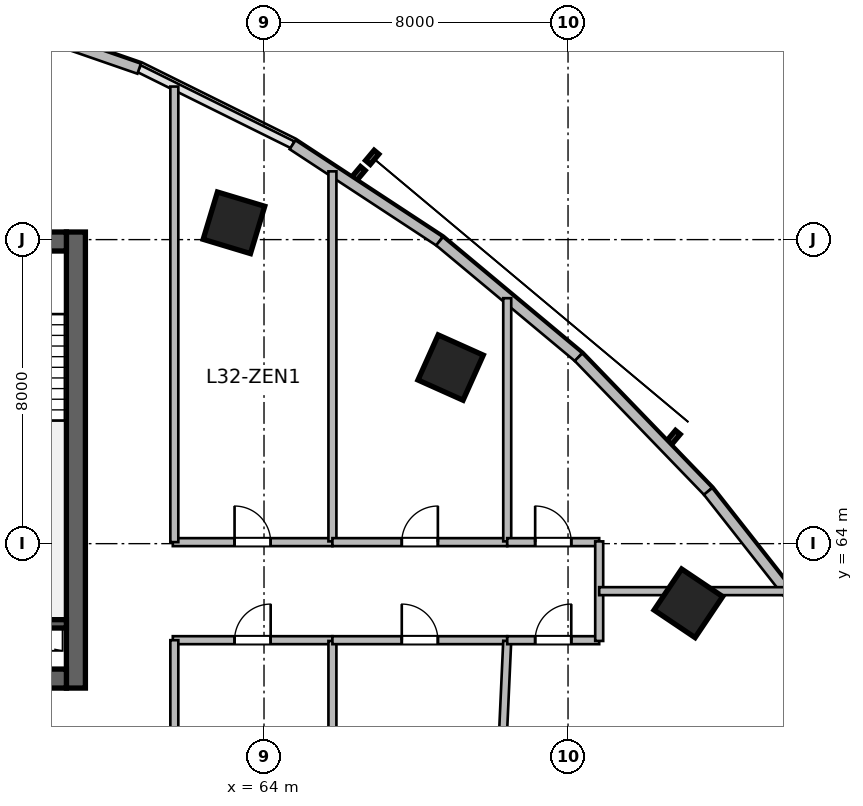
"""IFC4 building model, lengths in metres.
Left out: names, types, materials, properties, quantities, classifications, styles, units other than length and angle.
Written with IfcOpenShell. Run it as: python <this file> out.ifc"""

import sys

from ifc_helpers import new_model, si_unit, direction, frame, frame_2d, origin, origin_2d, place, context, subcontext, project, spatial, rectangle, extrude, source, transform, mapped, element, fill, save


model = new_model("IFC4")
c1 = context("Model", 3, precision=1e-05, world=origin(), true_north=direction((0.0, 1.0)))
c2 = subcontext(c1, "Body", "Model", "MODEL_VIEW")
j1 = project(units=[si_unit("LENGTHUNIT", "METRE"), si_unit("PLANEANGLEUNIT", "RADIAN")], contexts=[c1])
p1 = place(None, origin())
s1 = spatial("IfcSite", under=j1, at=p1, CompositionType="ELEMENT")
p2 = place(p1, origin())
s2 = spatial("IfcBuilding", under=s1, at=p2, CompositionType="ELEMENT")
p3 = place(p2, frame((0.0, 0.0, 135.0)))
s3 = spatial("IfcBuildingStorey", under=s2, at=p3, CompositionType="ELEMENT", Elevation=135.0)
m1 = source(origin(), c2, "Body", "SweptSolid", [
    extrude(rectangle(XDim=12.0, YDim=0.5, at=frame_2d((6.0, 0.0))), origin(), (0.0, 0.0, 1.0), 3.9),
])
p4 = place(p3, frame((59.05, 60.2, 0.0), z_axis=(0.0, 0.0, 1.0), x_axis=(0.0, 1.0, 0.0)))
e1 = element("IfcWall", 1, at=p4, inside=s3, PredefinedType="SHEAR", context=c2, shape_type="MappedRepresentation", body=[
    mapped(m1, transform((0.0, 0.0, 0.0), scale=1.0)),
])
m2 = source(origin(), c2, "Body", "SweptSolid", [
    extrude(rectangle(XDim=21.6, YDim=0.5, at=frame_2d((10.8, 0.0))), origin(), (0.0, 0.0, 1.0), 3.9),
])
p5 = place(p3, frame((37.2, 60.45, 0.0), z_axis=(0.0, 0.0, 1.0), x_axis=(1.0, 0.0, 0.0)))
e2 = element("IfcWall", 2, at=p5, inside=s3, PredefinedType="SHEAR", context=c2, shape_type="MappedRepresentation", body=[
    mapped(m2, transform((0.0, 0.0, 0.0), scale=1.0)),
])
p6 = place(p5, frame((1.1, 0.0, 0.0)))
e3 = element("IfcOpeningElement", 3, at=p6, cuts=e2, PredefinedType="OPENING", context=c2, shape_type="SweptSolid", body=[
    extrude(rectangle(XDim=1.15, YDim=2.15, at=frame_2d((0.575, 1.075))), frame((0.0, 0.26, 0.0), z_axis=(0.0, -1.0, 0.0), x_axis=(1.0, 0.0, 0.0)), (0.0, 0.0, 1.0), 0.52),
])
p7 = place(p5, frame((19.5, 0.0, 0.0)))
e4 = element("IfcOpeningElement", 4, at=p7, cuts=e2, PredefinedType="OPENING", context=c2, shape_type="SweptSolid", body=[
    extrude(rectangle(XDim=0.9, YDim=2.1, at=frame_2d((0.45, 1.05))), frame((0.0, 0.26, 0.0), z_axis=(0.0, -1.0, 0.0), x_axis=(1.0, 0.0, 0.0)), (0.0, 0.0, 1.0), 0.52),
])
p8 = place(p5, frame((12.02, 0.0, 0.0)))
e5 = element("IfcOpeningElement", 5, at=p8, cuts=e2, PredefinedType="OPENING", context=c2, shape_type="SweptSolid", body=[
    extrude(rectangle(XDim=1.6, YDim=2.15, at=frame_2d((0.8, 1.075))), frame((0.0, 0.26, 0.0), z_axis=(0.0, -1.0, 0.0), x_axis=(1.0, 0.0, 0.0)), (0.0, 0.0, 1.0), 0.52),
])
p9 = place(p3, frame((37.2, 71.95, 0.0), z_axis=(0.0, 0.0, 1.0), x_axis=(1.0, 0.0, 0.0)))
e6 = element("IfcWall", 6, at=p9, inside=s3, PredefinedType="SHEAR", context=c2, shape_type="MappedRepresentation", body=[
    mapped(m2, transform((0.0, 0.0, 0.0), scale=1.0)),
])
p10 = place(p9, frame((1.2, 0.0, 0.0)))
e7 = element("IfcOpeningElement", 7, at=p10, cuts=e6, PredefinedType="OPENING", context=c2, shape_type="SweptSolid", body=[
    extrude(rectangle(XDim=0.9, YDim=2.1, at=frame_2d((0.45, 1.05))), frame((0.0, 0.26, 0.0), z_axis=(0.0, -1.0, 0.0), x_axis=(1.0, 0.0, 0.0)), (0.0, 0.0, 1.0), 0.52),
])
p11 = place(p9, frame((14.7, 0.0, 0.0)))
e8 = element("IfcOpeningElement", 8, at=p11, cuts=e6, PredefinedType="OPENING", context=c2, shape_type="SweptSolid", body=[
    extrude(rectangle(XDim=1.2, YDim=2.15, at=frame_2d((0.6, 1.075))), frame((0.0, 0.26, 0.0), z_axis=(0.0, -1.0, 0.0), x_axis=(1.0, 0.0, 0.0)), (0.0, 0.0, 1.0), 0.52),
])
p12 = place(p9, frame((4.15, 0.0, 0.0)))
e9 = element("IfcOpeningElement", 9, at=p12, cuts=e6, PredefinedType="OPENING", context=c2, shape_type="SweptSolid", body=[
    extrude(rectangle(XDim=1.3, YDim=2.15, at=frame_2d((0.65, 1.075))), frame((0.0, 0.26, 0.0), z_axis=(0.0, -1.0, 0.0), x_axis=(1.0, 0.0, 0.0)), (0.0, 0.0, 1.0), 0.52),
])
p13 = place(p9, frame((7.25, 0.0, 0.0)))
e10 = element("IfcOpeningElement", 10, at=p13, cuts=e6, PredefinedType="OPENING", context=c2, shape_type="SweptSolid", body=[
    extrude(rectangle(XDim=0.9, YDim=2.1, at=frame_2d((0.45, 1.05))), frame((0.0, 0.26, 0.0), z_axis=(0.0, -1.0, 0.0), x_axis=(1.0, 0.0, 0.0)), (0.0, 0.0, 1.0), 0.52),
])
p14 = place(p9, frame((10.95, 0.0, 0.0)))
e11 = element("IfcOpeningElement", 11, at=p14, cuts=e6, PredefinedType="OPENING", context=c2, shape_type="SweptSolid", body=[
    extrude(rectangle(XDim=0.9, YDim=2.1, at=frame_2d((0.45, 1.05))), frame((0.0, 0.26, 0.0), z_axis=(0.0, -1.0, 0.0), x_axis=(1.0, 0.0, 0.0)), (0.0, 0.0, 1.0), 0.52),
])
m3 = source(origin(), c2, "Body", "SweptSolid", [
    extrude(rectangle(XDim=3.27, YDim=0.22, at=frame_2d((1.635, 0.0))), origin(), (0.0, 0.0, 1.0), 3.9),
])
p15 = place(p3, frame((55.53, 61.89, 0.0), z_axis=(0.0, 0.0, 1.0), x_axis=(1.0, 0.0, 0.0)))
e12 = element("IfcWall", 12, at=p15, inside=s3, PredefinedType="SHEAR", context=c2, shape_type="MappedRepresentation", body=[
    mapped(m3, transform((0.0, 0.0, 0.0), scale=1.0)),
])
m4 = source(origin(), c2, "Body", "SweptSolid", [
    extrude(rectangle(XDim=1.3, YDim=1.3, at=origin_2d()), origin(), (0.0, 0.0, 1.0), 3.9),
])
for number, where, z_axis, x_axis in (
    (13, (63.209, 72.442, 0.0), (0.0, 0.0, 1.0), (0.289, 0.957, 0.0)),
    (14, (68.91, 68.633, 0.0), (0.0, 0.0, 1.0), (0.409, 0.912, 0.0)),
    (15, (75.167, 62.43, 0.0), (0.0, 0.0, 1.0), (0.558, 0.83, 0.0)),
):
    element("IfcColumn", number, at=place(p3, frame(where, z_axis=z_axis, x_axis=x_axis)), inside=s3, PredefinedType="COLUMN", context=c2, shape_type="MappedRepresentation", body=[
        mapped(m4, transform((0.0, 0.0, 0.0), scale=1.0)),
    ])
m5 = source(origin(), c2, "Body", "SweptSolid", [
    extrude(rectangle(XDim=4.409, YDim=0.28, at=frame_2d((2.205, 0.0))), origin(), (0.0, 0.0, 1.0), 3.65),
])
p16 = place(p3, frame((56.548, 77.941, 0.0), z_axis=(0.0, 0.0, 1.0), x_axis=(0.944879374121, -0.327418643881, 0.0)))
e16 = element("IfcWall", 16, at=p16, inside=s3, PredefinedType="SOLIDWALL", context=c2, shape_type="MappedRepresentation", body=[
    mapped(m5, transform((0.0, 0.0, 0.0), scale=1.0)),
])
m6 = source(origin(), c2, "Body", "SweptSolid", [
    extrude(rectangle(XDim=4.626, YDim=0.28, at=frame_2d((2.313, 0.0))), origin(), (0.0, 0.0, 1.0), 3.65),
])
p17 = place(p3, frame((64.751, 74.496, 0.0), z_axis=(0.0, 0.0, 1.0), x_axis=(0.83595938331, -0.548791316855, 0.0)))
e17 = element("IfcWall", 17, at=p17, inside=s3, PredefinedType="SOLIDWALL", context=c2, shape_type="MappedRepresentation", body=[
    mapped(m6, transform((0.0, 0.0, 0.0), scale=1.0)),
])
m7 = source(origin(), c2, "Body", "SweptSolid", [
    extrude(rectangle(XDim=4.762, YDim=0.28, at=frame_2d((2.381, 0.0))), origin(), (0.0, 0.0, 1.0), 3.65),
])
p18 = place(p3, frame((68.618, 71.958, 0.0), z_axis=(0.0, 0.0, 1.0), x_axis=(0.767952279762, -0.640507061638, 0.0)))
e18 = element("IfcWall", 18, at=p18, inside=s3, PredefinedType="SOLIDWALL", context=c2, shape_type="MappedRepresentation", body=[
    mapped(m7, transform((0.0, 0.0, 0.0), scale=1.0)),
])
m8 = source(origin(), c2, "Body", "SweptSolid", [
    extrude(rectangle(XDim=4.908, YDim=0.28, at=frame_2d((2.454, 0.0))), origin(), (0.0, 0.0, 1.0), 3.65),
])
p19 = place(p3, frame((72.275, 68.907, 0.0), z_axis=(0.0, 0.0, 1.0), x_axis=(0.694613154328, -0.719383462302, 0.0)))
e19 = element("IfcWall", 19, at=p19, inside=s3, PredefinedType="SOLIDWALL", context=c2, shape_type="MappedRepresentation", body=[
    mapped(m8, transform((0.0, 0.0, 0.0), scale=1.0)),
])
m9 = source(origin(), c2, "Body", "SweptSolid", [
    extrude(rectangle(XDim=5.058, YDim=0.28, at=frame_2d((2.529, 0.0))), origin(), (0.0, 0.0, 1.0), 3.65),
])
p20 = place(p3, frame((75.685, 65.376, 0.0), z_axis=(0.0, 0.0, 1.0), x_axis=(0.618145507434, -0.786063694391, 0.0)))
e20 = element("IfcWall", 20, at=p20, inside=s3, PredefinedType="SOLIDWALL", context=c2, shape_type="MappedRepresentation", body=[
    mapped(m9, transform((0.0, 0.0, 0.0), scale=1.0)),
])
m10 = source(origin(), c2, "Body", "SweptSolid", [
    extrude(rectangle(XDim=4.2, YDim=0.21, at=frame_2d((2.1, 0.0))), origin(), (0.0, 0.0, 1.0), 3.65),
])
p21 = place(p3, frame((61.6, 64.04, 0.0), z_axis=(0.0, 0.0, 1.0), x_axis=(1.0, 0.0, 0.0)))
e21 = element("IfcWall", 21, at=p21, inside=s3, PredefinedType="PARTITIONING", context=c2, shape_type="MappedRepresentation", body=[
    mapped(m10, transform((0.0, 0.0, 0.0), scale=1.0)),
])
p22 = place(p21, frame((1.625, 0.0, 0.0)))
e22 = element("IfcOpeningElement", 22, at=p22, cuts=e21, PredefinedType="OPENING", context=c2, shape_type="SweptSolid", body=[
    extrude(rectangle(XDim=0.95, YDim=2.1, at=frame_2d((0.475, 1.05))), frame((0.0, 0.115, 0.0), z_axis=(0.0, -1.0, 0.0), x_axis=(1.0, 0.0, 0.0)), (0.0, 0.0, 1.0), 0.23),
])
m11 = source(origin(), c2, "Body", "SweptSolid", [
    extrude(rectangle(XDim=9.736, YDim=0.21, at=frame_2d((4.868, 0.0))), origin(), (0.0, 0.0, 1.0), 3.65),
])
p23 = place(p3, frame((65.8, 64.06, 0.0), z_axis=(0.0, 0.0, 1.0), x_axis=(0.0, 1.0, 0.0)))
e23 = element("IfcWall", 23, at=p23, inside=s3, PredefinedType="PARTITIONING", context=c2, shape_type="MappedRepresentation", body=[
    mapped(m11, transform((0.0, 0.0, 0.0), scale=1.0)),
])
m12 = source(origin(), c2, "Body", "SweptSolid", [
    extrude(rectangle(XDim=4.6, YDim=0.21, at=frame_2d((2.3, 0.0))), origin(), (0.0, 0.0, 1.0), 3.65),
])
p24 = place(p3, frame((65.8, 64.04, 0.0), z_axis=(0.0, 0.0, 1.0), x_axis=(1.0, 0.0, 0.0)))
e24 = element("IfcWall", 24, at=p24, inside=s3, PredefinedType="PARTITIONING", context=c2, shape_type="MappedRepresentation", body=[
    mapped(m12, transform((0.0, 0.0, 0.0), scale=1.0)),
])
p25 = place(p24, frame((1.825, 0.0, 0.0)))
e25 = element("IfcOpeningElement", 25, at=p25, cuts=e24, PredefinedType="OPENING", context=c2, shape_type="SweptSolid", body=[
    extrude(rectangle(XDim=0.95, YDim=2.1, at=frame_2d((0.475, 1.05))), frame((0.0, 0.115, 0.0), z_axis=(0.0, -1.0, 0.0), x_axis=(1.0, 0.0, 0.0)), (0.0, 0.0, 1.0), 0.23),
])
m13 = source(origin(), c2, "Body", "SweptSolid", [
    extrude(rectangle(XDim=6.398, YDim=0.21, at=frame_2d((3.199, 0.0))), origin(), (0.0, 0.0, 1.0), 3.65),
])
p26 = place(p3, frame((70.4, 64.06, 0.0), z_axis=(0.0, 0.0, 1.0), x_axis=(0.0, 1.0, 0.0)))
e26 = element("IfcWall", 26, at=p26, inside=s3, PredefinedType="PARTITIONING", context=c2, shape_type="MappedRepresentation", body=[
    mapped(m13, transform((0.0, 0.0, 0.0), scale=1.0)),
])
m14 = source(origin(), c2, "Body", "SweptSolid", [
    extrude(rectangle(XDim=2.42, YDim=0.21, at=frame_2d((1.21, 0.0))), origin(), (0.0, 0.0, 1.0), 3.65),
])
p27 = place(p3, frame((70.4, 64.04, 0.0), z_axis=(0.0, 0.0, 1.0), x_axis=(1.0, 0.0, 0.0)))
e27 = element("IfcWall", 27, at=p27, inside=s3, PredefinedType="PARTITIONING", context=c2, shape_type="MappedRepresentation", body=[
    mapped(m14, transform((0.0, 0.0, 0.0), scale=1.0)),
])
p28 = place(p27, frame((0.735, 0.0, 0.0)))
e28 = element("IfcOpeningElement", 28, at=p28, cuts=e27, PredefinedType="OPENING", context=c2, shape_type="SweptSolid", body=[
    extrude(rectangle(XDim=0.95, YDim=2.1, at=frame_2d((0.475, 1.05))), frame((0.0, 0.115, 0.0), z_axis=(0.0, -1.0, 0.0), x_axis=(1.0, 0.0, 0.0)), (0.0, 0.0, 1.0), 0.23),
])
p29 = place(p3, frame((61.6, 61.46, 0.0), z_axis=(0.0, 0.0, 1.0), x_axis=(1.0, 0.0, 0.0)))
e29 = element("IfcWall", 29, at=p29, inside=s3, PredefinedType="PARTITIONING", context=c2, shape_type="MappedRepresentation", body=[
    mapped(m10, transform((0.0, 0.0, 0.0), scale=1.0)),
])
p30 = place(p29, frame((1.625, 0.0, 0.0)))
e30 = element("IfcOpeningElement", 30, at=p30, cuts=e29, PredefinedType="OPENING", context=c2, shape_type="SweptSolid", body=[
    extrude(rectangle(XDim=0.95, YDim=2.1, at=frame_2d((0.475, 1.05))), frame((0.0, 0.115, 0.0), z_axis=(0.0, -1.0, 0.0), x_axis=(1.0, 0.0, 0.0)), (0.0, 0.0, 1.0), 0.23),
])
m15 = source(origin(), c2, "Body", "SweptSolid", [
    extrude(rectangle(XDim=19.103, YDim=0.21, at=frame_2d((9.552, 0.0))), origin(), (0.0, 0.0, 1.0), 2.942),
])
p31 = place(p3, frame((65.8, 42.337, 0.0), z_axis=(0.0, 0.0, 1.0), x_axis=(0.0, 1.0, 0.0)))
e31 = element("IfcWall", 31, at=p31, inside=s3, PredefinedType="PARTITIONING", context=c2, shape_type="MappedRepresentation", body=[
    mapped(m15, transform((0.0, 0.0, 0.0), scale=1.0)),
])
p32 = place(p3, frame((65.8, 61.46, 0.0), z_axis=(0.0, 0.0, 1.0), x_axis=(1.0, 0.0, 0.0)))
e32 = element("IfcWall", 32, at=p32, inside=s3, PredefinedType="PARTITIONING", context=c2, shape_type="MappedRepresentation", body=[
    mapped(m12, transform((0.0, 0.0, 0.0), scale=1.0)),
])
p33 = place(p32, frame((1.825, 0.0, 0.0)))
e33 = element("IfcOpeningElement", 33, at=p33, cuts=e32, PredefinedType="OPENING", context=c2, shape_type="SweptSolid", body=[
    extrude(rectangle(XDim=0.95, YDim=2.1, at=frame_2d((0.475, 1.05))), frame((0.0, 0.115, 0.0), z_axis=(0.0, -1.0, 0.0), x_axis=(1.0, 0.0, 0.0)), (0.0, 0.0, 1.0), 0.23),
])
m16 = source(origin(), c2, "Body", "SweptSolid", [
    extrude(rectangle(XDim=24.224, YDim=0.21, at=frame_2d((12.112, 0.0))), origin(), (0.0, 0.0, 1.0), 2.942),
])
p34 = place(p3, frame((69.302, 37.241, 0.0), z_axis=(0.0, 0.0, 1.0), x_axis=(0.045312570313, 0.998972857975, 0.0)))
e34 = element("IfcWall", 34, at=p34, inside=s3, PredefinedType="PARTITIONING", context=c2, shape_type="MappedRepresentation", body=[
    mapped(m16, transform((0.0, 0.0, 0.0), scale=1.0)),
])
p35 = place(p3, frame((70.4, 61.46, 0.0), z_axis=(0.0, 0.0, 1.0), x_axis=(1.0, 0.0, 0.0)))
e35 = element("IfcWall", 35, at=p35, inside=s3, PredefinedType="PARTITIONING", context=c2, shape_type="MappedRepresentation", body=[
    mapped(m14, transform((0.0, 0.0, 0.0), scale=1.0)),
])
p36 = place(p35, frame((0.735, 0.0, 0.0)))
e36 = element("IfcOpeningElement", 36, at=p36, cuts=e35, PredefinedType="OPENING", context=c2, shape_type="SweptSolid", body=[
    extrude(rectangle(XDim=0.95, YDim=2.1, at=frame_2d((0.475, 1.05))), frame((0.0, 0.115, 0.0), z_axis=(0.0, -1.0, 0.0), x_axis=(1.0, 0.0, 0.0)), (0.0, 0.0, 1.0), 0.23),
])
m17 = source(origin(), c2, "Body", "SweptSolid", [
    extrude(rectangle(XDim=13.988, YDim=0.21, at=frame_2d((6.994, 0.0))), origin(), (0.0, 0.0, 1.0), 2.942),
])
p37 = place(p3, frame((61.64, 47.472, 0.0), z_axis=(0.0, 0.0, 1.0), x_axis=(0.0, 1.0, 0.0)))
e37 = element("IfcWall", 37, at=p37, inside=s3, PredefinedType="PARTITIONING", context=c2, shape_type="MappedRepresentation", body=[
    mapped(m17, transform((0.0, 0.0, 0.0), scale=1.0)),
])
m18 = source(origin(), c2, "Body", "SweptSolid", [
    extrude(rectangle(XDim=11.987, YDim=0.21, at=frame_2d((5.994, 0.0))), origin(), (0.0, 0.0, 1.0), 3.65),
])
p38 = place(p3, frame((61.64, 64.04, 0.0), z_axis=(0.0, 0.0, 1.0), x_axis=(0.0, 1.0, 0.0)))
e38 = element("IfcWall", 38, at=p38, inside=s3, PredefinedType="PARTITIONING", context=c2, shape_type="MappedRepresentation", body=[
    mapped(m18, transform((0.0, 0.0, 0.0), scale=1.0)),
])
m19 = source(origin(), c2, "Body", "SweptSolid", [
    extrude(rectangle(XDim=2.62, YDim=0.21, at=frame_2d((1.31, 0.0))), origin(), (0.0, 0.0, 1.0), 3.28),
])
p39 = place(p3, frame((72.82, 61.44, 0.0), z_axis=(0.0, 0.0, 1.0), x_axis=(0.0, 1.0, 0.0)))
e39 = element("IfcWall", 39, at=p39, inside=s3, PredefinedType="PARTITIONING", context=c2, shape_type="MappedRepresentation", body=[
    mapped(m19, transform((0.0, 0.0, 0.0), scale=1.0)),
])
m20 = source(origin(), c2, "Body", "SweptSolid", [
    extrude(rectangle(XDim=4.917, YDim=0.21, at=frame_2d((2.459, 0.0))), origin(), (0.0, 0.0, 1.0), 3.65),
])
p40 = place(p3, frame((72.82, 62.75, 0.0), z_axis=(0.0, 0.0, 1.0), x_axis=(1.0, 0.0, 0.0)))
e40 = element("IfcWall", 40, at=p40, inside=s3, PredefinedType="PARTITIONING", context=c2, shape_type="MappedRepresentation", body=[
    mapped(m20, transform((0.0, 0.0, 0.0), scale=1.0)),
])
m21 = source(origin(), c2, "Body", "SweptSolid", [
    extrude(rectangle(XDim=0.95, YDim=2.1, at=frame_2d((0.475, 1.05))), frame((0.0, 0.025, 0.0), z_axis=(0.0, -1.0, 0.0), x_axis=(1.0, 0.0, 0.0)), (0.0, 0.0, 1.0), 0.05),
])
p41 = place(p22, origin())
e41 = element("IfcDoor", 41, at=p41, inside=s3, OperationType="SINGLE_SWING_LEFT", PredefinedType="DOOR", context=c2, shape_type="MappedRepresentation", body=[
    mapped(m21, transform((0.0, 0.0, 0.0), scale=1.0)),
])
fill(e22, e41)
p42 = place(p25, origin())
e42 = element("IfcDoor", 42, at=p42, inside=s3, OperationType="SINGLE_SWING_RIGHT", PredefinedType="DOOR", context=c2, shape_type="MappedRepresentation", body=[
    mapped(m21, transform((0.0, 0.0, 0.0), scale=1.0)),
])
fill(e25, e42)
p43 = place(p28, origin())
e43 = element("IfcDoor", 43, at=p43, inside=s3, OperationType="SINGLE_SWING_LEFT", PredefinedType="DOOR", context=c2, shape_type="MappedRepresentation", body=[
    mapped(m21, transform((0.0, 0.0, 0.0), scale=1.0)),
])
fill(e28, e43)
p44 = place(p30, origin())
e44 = element("IfcDoor", 44, at=p44, inside=s3, OperationType="SINGLE_SWING_RIGHT", PredefinedType="DOOR", context=c2, shape_type="MappedRepresentation", body=[
    mapped(m21, transform((0.0, 0.0, 0.0), scale=1.0)),
])
fill(e30, e44)
p45 = place(p33, origin())
e45 = element("IfcDoor", 45, at=p45, inside=s3, OperationType="SINGLE_SWING_LEFT", PredefinedType="DOOR", context=c2, shape_type="MappedRepresentation", body=[
    mapped(m21, transform((0.0, 0.0, 0.0), scale=1.0)),
])
fill(e33, e45)
p46 = place(p36, origin())
e46 = element("IfcDoor", 46, at=p46, inside=s3, OperationType="SINGLE_SWING_RIGHT", PredefinedType="DOOR", context=c2, shape_type="MappedRepresentation", body=[
    mapped(m21, transform((0.0, 0.0, 0.0), scale=1.0)),
])
fill(e36, e46)
save(model, sys.argv[1])
